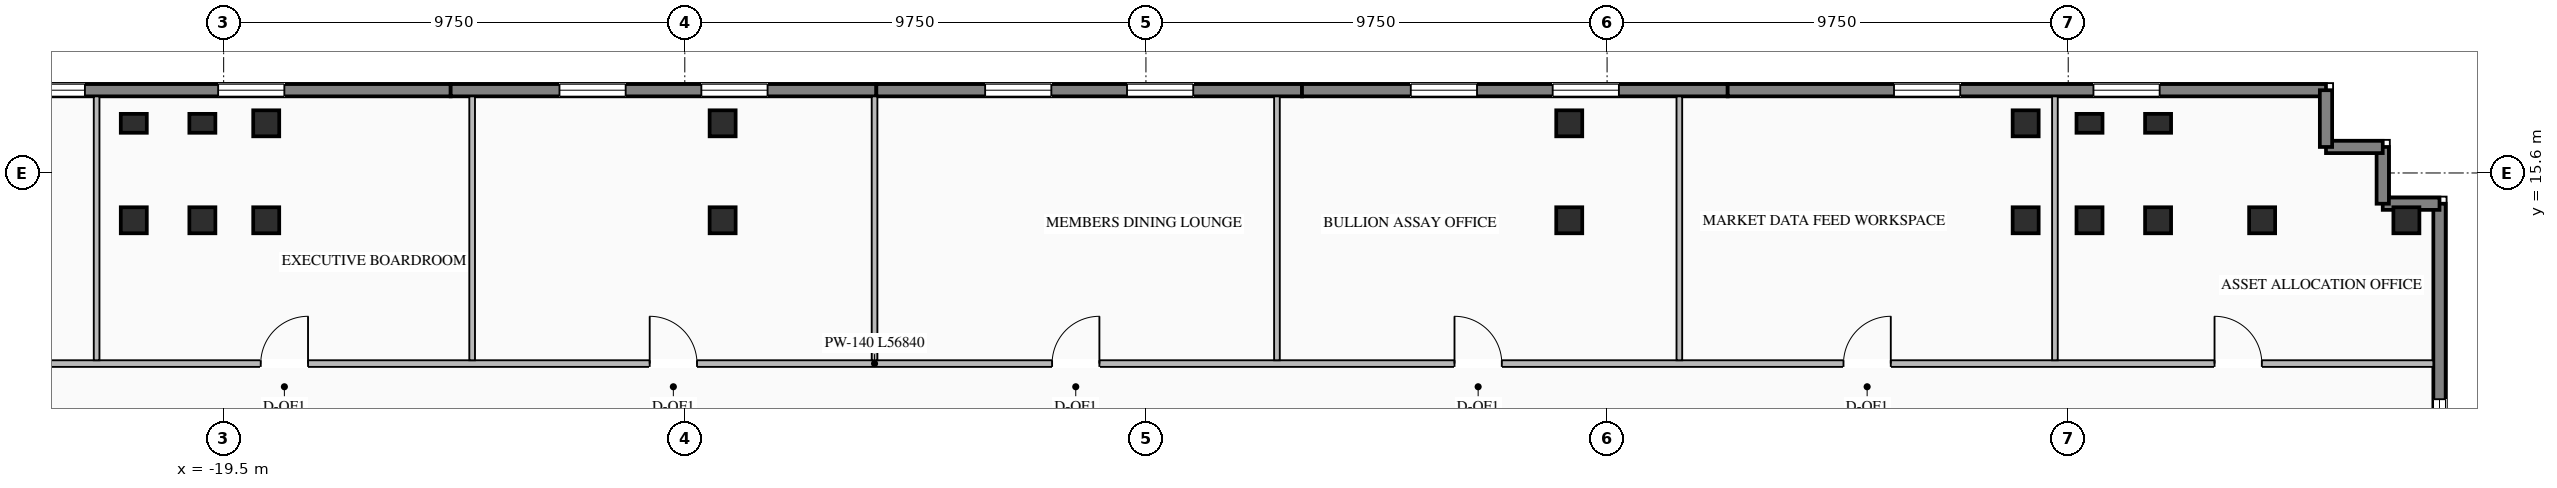
"""IFC4 building model, lengths in metres.
Left out: names, types, materials, properties, quantities, classifications, styles, units other than length and angle.
Written with IfcOpenShell. Run it as: python <this file> out.ifc"""

import sys

from ifc_helpers import new_model, si_unit, direction, frame, frame_2d, origin, origin_2d, place, context, subcontext, project, spatial, rectangle, i_section, extrude, element, fill, save


model = new_model("IFC4")
c1 = context("Model", 3, precision=1e-05, world=origin(), true_north=direction((0.0, 1.0)))
c2 = subcontext(c1, "Body", "Model", "MODEL_VIEW")
j1 = project(units=[si_unit("LENGTHUNIT", "METRE"), si_unit("PLANEANGLEUNIT", "RADIAN")], contexts=[c1])
p1 = place(None, origin())
s1 = spatial("IfcSite", under=j1, at=p1, CompositionType="ELEMENT")
p2 = place(p1, origin())
s2 = spatial("IfcBuilding", under=s1, at=p2, CompositionType="ELEMENT")
p3 = place(p2, frame((0.0, 0.0, 236.1)))
s3 = spatial("IfcBuildingStorey", under=s2, at=p3, CompositionType="ELEMENT", Elevation=236.1)
for number, where, z_axis, x_axis in (
    (1, (-21.4, 14.6, 0.0), (0.0, 0.0, 1.0), (1.0, 0.0, 0.0)),
    (2, (-19.95, 14.6, 0.0), (0.0, 0.0, 1.0), (1.0, 0.0, 0.0)),
    (3, (-18.6, 14.6, 0.0), (0.0, 0.0, 1.0), (1.0, 0.0, 0.0)),
    (4, (-8.95, 14.6, 0.0), (0.0, 0.0, 1.0), (1.0, 0.0, 0.0)),
    (5, (8.95, 14.6, 0.0), (0.0, 0.0, 1.0), (1.0, 0.0, 0.0)),
    (6, (18.6, 14.6, 0.0), (0.0, 0.0, 1.0), (1.0, 0.0, 0.0)),
    (7, (19.95, 14.6, 0.0), (0.0, 0.0, 1.0), (1.0, 0.0, 0.0)),
    (8, (21.4, 14.6, 0.0), (0.0, 0.0, 1.0), (1.0, 0.0, 0.0)),
    (9, (23.6, 14.6, 0.0), (0.0, 0.0, 1.0), (1.0, 0.0, 0.0)),
    (10, (-18.6, 16.65, 0.0), (0.0, 0.0, 1.0), (1.0, 0.0, 0.0)),
    (11, (-8.95, 16.65, 0.0), (0.0, 0.0, 1.0), (1.0, 0.0, 0.0)),
    (12, (8.95, 16.65, 0.0), (0.0, 0.0, 1.0), (1.0, 0.0, 0.0)),
    (13, (18.6, 16.65, 0.0), (0.0, 0.0, 1.0), (1.0, 0.0, 0.0)),
    (14, (26.65, 14.6, 0.0), (0.0, 0.0, 1.0), (1.0, 0.0, 0.0)),
):
    element("IfcColumn", number, at=place(p3, frame(where, z_axis=z_axis, x_axis=x_axis)), inside=s3, PredefinedType="COLUMN", context=c2, shape_type="SweptSolid", body=[
        extrude(i_section(OverallWidth=0.55, OverallDepth=0.55, WebThickness=0.024, FlangeThickness=0.036, at=origin_2d()), origin(), (0.0, 0.0, 1.0), 3.45),
    ])
for number, where, z_axis, x_axis in (
    (15, (-21.4, 16.65, 0.0), (0.0, 0.0, 1.0), (1.0, 0.0, 0.0)),
    (16, (-19.95, 16.65, 0.0), (0.0, 0.0, 1.0), (1.0, 0.0, 0.0)),
    (17, (19.95, 16.65, 0.0), (0.0, 0.0, 1.0), (1.0, 0.0, 0.0)),
    (18, (21.4, 16.65, 0.0), (0.0, 0.0, 1.0), (1.0, 0.0, 0.0)),
):
    element("IfcColumn", number, at=place(p3, frame(where, z_axis=z_axis, x_axis=x_axis)), inside=s3, PredefinedType="PILASTER", context=c2, shape_type="SweptSolid", body=[
        extrude(rectangle(XDim=0.55, YDim=0.4, at=origin_2d()), origin(), (0.0, 0.0, 1.0), 3.45),
    ])
p4 = place(p3, frame((-27.35, 17.35, 0.0), z_axis=(0.0, 0.0, 1.0), x_axis=(1.0, 0.0, 0.0)))
e19 = element("IfcWall", 19, at=p4, inside=s3, PredefinedType="STANDARD", context=c2, shape_type="SweptSolid", body=[
    extrude(rectangle(XDim=12.65, YDim=0.26, at=frame_2d((6.325, 0.0))), origin(), (0.0, 0.0, 1.0), 3.25),
])
p5 = place(p4, frame((3.517, 0.0, 0.76)))
e20 = element("IfcOpeningElement", 20, at=p5, cuts=e19, PredefinedType="OPENING", context=c2, shape_type="SweptSolid", body=[
    extrude(rectangle(XDim=1.4, YDim=1.95, at=frame_2d((0.7, 0.975))), frame((0.0, 0.14, 0.0), z_axis=(0.0, -1.0, 0.0), x_axis=(1.0, 0.0, 0.0)), (0.0, 0.0, 1.0), 0.28),
])
p6 = place(p4, frame((7.733, 0.0, 0.76)))
e21 = element("IfcOpeningElement", 21, at=p6, cuts=e19, PredefinedType="OPENING", context=c2, shape_type="SweptSolid", body=[
    extrude(rectangle(XDim=1.4, YDim=1.95, at=frame_2d((0.7, 0.975))), frame((0.0, 0.14, 0.0), z_axis=(0.0, -1.0, 0.0), x_axis=(1.0, 0.0, 0.0)), (0.0, 0.0, 1.0), 0.28),
])
p7 = place(p3, frame((-14.7, 17.35, 0.0), z_axis=(0.0, 0.0, 1.0), x_axis=(1.0, 0.0, 0.0)))
e22 = element("IfcWall", 22, at=p7, inside=s3, PredefinedType="STANDARD", context=c2, shape_type="SweptSolid", body=[
    extrude(rectangle(XDim=9.0, YDim=0.26, at=frame_2d((4.5, 0.0))), origin(), (0.0, 0.0, 1.0), 3.25),
])
p8 = place(p7, frame((2.3, 0.0, 0.76)))
e23 = element("IfcOpeningElement", 23, at=p8, cuts=e22, PredefinedType="OPENING", context=c2, shape_type="SweptSolid", body=[
    extrude(rectangle(XDim=1.4, YDim=1.95, at=frame_2d((0.7, 0.975))), frame((0.0, 0.14, 0.0), z_axis=(0.0, -1.0, 0.0), x_axis=(1.0, 0.0, 0.0)), (0.0, 0.0, 1.0), 0.28),
])
p9 = place(p7, frame((5.3, 0.0, 0.76)))
e24 = element("IfcOpeningElement", 24, at=p9, cuts=e22, PredefinedType="OPENING", context=c2, shape_type="SweptSolid", body=[
    extrude(rectangle(XDim=1.4, YDim=1.95, at=frame_2d((0.7, 0.975))), frame((0.0, 0.14, 0.0), z_axis=(0.0, -1.0, 0.0), x_axis=(1.0, 0.0, 0.0)), (0.0, 0.0, 1.0), 0.28),
])
p10 = place(p3, frame((-5.7, 17.35, 0.0), z_axis=(0.0, 0.0, 1.0), x_axis=(1.0, 0.0, 0.0)))
e25 = element("IfcWall", 25, at=p10, inside=s3, PredefinedType="STANDARD", context=c2, shape_type="SweptSolid", body=[
    extrude(rectangle(XDim=9.0, YDim=0.26, at=frame_2d((4.5, 0.0))), origin(), (0.0, 0.0, 1.0), 3.25),
])
p11 = place(p10, frame((2.3, 0.0, 0.76)))
e26 = element("IfcOpeningElement", 26, at=p11, cuts=e25, PredefinedType="OPENING", context=c2, shape_type="SweptSolid", body=[
    extrude(rectangle(XDim=1.4, YDim=1.95, at=frame_2d((0.7, 0.975))), frame((0.0, 0.14, 0.0), z_axis=(0.0, -1.0, 0.0), x_axis=(1.0, 0.0, 0.0)), (0.0, 0.0, 1.0), 0.28),
])
p12 = place(p10, frame((5.3, 0.0, 0.76)))
e27 = element("IfcOpeningElement", 27, at=p12, cuts=e25, PredefinedType="OPENING", context=c2, shape_type="SweptSolid", body=[
    extrude(rectangle(XDim=1.4, YDim=1.95, at=frame_2d((0.7, 0.975))), frame((0.0, 0.14, 0.0), z_axis=(0.0, -1.0, 0.0), x_axis=(1.0, 0.0, 0.0)), (0.0, 0.0, 1.0), 0.28),
])
p13 = place(p3, frame((3.3, 17.35, 0.0), z_axis=(0.0, 0.0, 1.0), x_axis=(1.0, 0.0, 0.0)))
e28 = element("IfcWall", 28, at=p13, inside=s3, PredefinedType="STANDARD", context=c2, shape_type="SweptSolid", body=[
    extrude(rectangle(XDim=9.0, YDim=0.26, at=frame_2d((4.5, 0.0))), origin(), (0.0, 0.0, 1.0), 3.25),
])
p14 = place(p13, frame((2.3, 0.0, 0.76)))
e29 = element("IfcOpeningElement", 29, at=p14, cuts=e28, PredefinedType="OPENING", context=c2, shape_type="SweptSolid", body=[
    extrude(rectangle(XDim=1.4, YDim=1.95, at=frame_2d((0.7, 0.975))), frame((0.0, 0.14, 0.0), z_axis=(0.0, -1.0, 0.0), x_axis=(1.0, 0.0, 0.0)), (0.0, 0.0, 1.0), 0.28),
])
p15 = place(p13, frame((5.3, 0.0, 0.76)))
e30 = element("IfcOpeningElement", 30, at=p15, cuts=e28, PredefinedType="OPENING", context=c2, shape_type="SweptSolid", body=[
    extrude(rectangle(XDim=1.4, YDim=1.95, at=frame_2d((0.7, 0.975))), frame((0.0, 0.14, 0.0), z_axis=(0.0, -1.0, 0.0), x_axis=(1.0, 0.0, 0.0)), (0.0, 0.0, 1.0), 0.28),
])
p16 = place(p3, frame((12.3, 17.35, 0.0), z_axis=(0.0, 0.0, 1.0), x_axis=(1.0, 0.0, 0.0)))
e31 = element("IfcWall", 31, at=p16, inside=s3, PredefinedType="STANDARD", context=c2, shape_type="SweptSolid", body=[
    extrude(rectangle(XDim=12.65, YDim=0.26, at=frame_2d((6.325, 0.0))), origin(), (0.0, 0.0, 1.0), 3.25),
])
p17 = place(p16, frame((3.517, 0.0, 0.76)))
e32 = element("IfcOpeningElement", 32, at=p17, cuts=e31, PredefinedType="OPENING", context=c2, shape_type="SweptSolid", body=[
    extrude(rectangle(XDim=1.4, YDim=1.95, at=frame_2d((0.7, 0.975))), frame((0.0, 0.14, 0.0), z_axis=(0.0, -1.0, 0.0), x_axis=(1.0, 0.0, 0.0)), (0.0, 0.0, 1.0), 0.28),
])
p18 = place(p16, frame((7.733, 0.0, 0.76)))
e33 = element("IfcOpeningElement", 33, at=p18, cuts=e31, PredefinedType="OPENING", context=c2, shape_type="SweptSolid", body=[
    extrude(rectangle(XDim=1.4, YDim=1.95, at=frame_2d((0.7, 0.975))), frame((0.0, 0.14, 0.0), z_axis=(0.0, -1.0, 0.0), x_axis=(1.0, 0.0, 0.0)), (0.0, 0.0, 1.0), 0.28),
])
p19 = place(p3, frame((27.35, 14.95, 0.0), z_axis=(0.0, 0.0, 1.0), x_axis=(0.0, -1.0, 0.0)))
e34 = element("IfcWall", 34, at=p19, inside=s3, PredefinedType="STANDARD", context=c2, shape_type="SweptSolid", body=[
    extrude(rectangle(XDim=15.85, YDim=0.26, at=frame_2d((7.925, 0.0))), origin(), (0.0, 0.0, 1.0), 3.25),
])
p20 = place(p19, frame((4.133, 0.0, 0.76)))
e35 = element("IfcOpeningElement", 35, at=p20, cuts=e34, PredefinedType="OPENING", context=c2, shape_type="SweptSolid", body=[
    extrude(rectangle(XDim=1.2, YDim=1.95, at=frame_2d((0.6, 0.975))), frame((0.0, 0.14, 0.0), z_axis=(0.0, -1.0, 0.0), x_axis=(1.0, 0.0, 0.0)), (0.0, 0.0, 1.0), 0.28),
])
p21 = place(p19, frame((9.967, 0.0, 0.76)))
e36 = element("IfcOpeningElement", 36, at=p21, cuts=e34, PredefinedType="OPENING", context=c2, shape_type="SweptSolid", body=[
    extrude(rectangle(XDim=1.2, YDim=1.95, at=frame_2d((0.6, 0.975))), frame((0.0, 0.14, 0.0), z_axis=(0.0, -1.0, 0.0), x_axis=(1.0, 0.0, 0.0)), (0.0, 0.0, 1.0), 0.28),
])
p22 = place(p3, frame((27.35, 14.95, 0.0), z_axis=(0.0, 0.0, 1.0), x_axis=(-1.0, 0.0, 0.0)))
e37 = element("IfcWall", 37, at=p22, inside=s3, PredefinedType="STANDARD", context=c2, shape_type="SweptSolid", body=[
    extrude(rectangle(XDim=1.2, YDim=0.26, at=frame_2d((0.6, 0.0))), origin(), (0.0, 0.0, 1.0), 2.565),
])
for number, where, z_axis, x_axis in (
    (38, (26.15, 14.95, 0.0), (0.0, 0.0, 1.0), (0.0, 1.0, 0.0)),
    (39, (26.15, 16.15, 0.0), (0.0, 0.0, 1.0), (-1.0, 0.0, 0.0)),
):
    element("IfcWall", number, at=place(p3, frame(where, z_axis=z_axis, x_axis=x_axis)), inside=s3, PredefinedType="STANDARD", context=c2, shape_type="SweptSolid", body=[
        extrude(rectangle(XDim=1.2, YDim=0.26, at=frame_2d((0.6, 0.0))), origin(), (0.0, 0.0, 1.0), 2.565),
    ])
p23 = place(p3, frame((24.95, 16.15, 0.0), z_axis=(0.0, 0.0, 1.0), x_axis=(0.0, 1.0, 0.0)))
e40 = element("IfcWall", 40, at=p23, inside=s3, PredefinedType="STANDARD", context=c2, shape_type="SweptSolid", body=[
    extrude(rectangle(XDim=1.2, YDim=0.26, at=frame_2d((0.6, 0.0))), origin(), (0.0, 0.0, 1.0), 2.565),
])
p24 = place(p3, frame((-29.62, 11.57, 0.0), z_axis=(0.0, 0.0, 1.0), x_axis=(1.0, 0.0, 0.0)))
e41 = element("IfcWall", 41, at=p24, inside=s3, PredefinedType="STANDARD", context=c2, shape_type="SweptSolid", body=[
    extrude(rectangle(XDim=56.84, YDim=0.14, at=frame_2d((28.42, 0.0))), origin(), (0.0, 0.0, 1.0), 2.845),
])
p25 = place(p24, frame((3.343, 0.0, 0.0)))
e42 = element("IfcOpeningElement", 42, at=p25, cuts=e41, PredefinedType="OPENING", context=c2, shape_type="SweptSolid", body=[
    extrude(rectangle(XDim=1.0, YDim=2.08, at=frame_2d((0.5, 1.04))), frame((0.0, 0.08, 0.0), z_axis=(0.0, -1.0, 0.0), x_axis=(1.0, 0.0, 0.0)), (0.0, 0.0, 1.0), 0.16),
])
p26 = place(p24, frame((10.904, 0.0, 0.0)))
e43 = element("IfcOpeningElement", 43, at=p26, cuts=e41, PredefinedType="OPENING", context=c2, shape_type="SweptSolid", body=[
    extrude(rectangle(XDim=1.0, YDim=2.08, at=frame_2d((0.5, 1.04))), frame((0.0, 0.08, 0.0), z_axis=(0.0, -1.0, 0.0), x_axis=(1.0, 0.0, 0.0)), (0.0, 0.0, 1.0), 0.16),
])
p27 = place(p24, frame((19.128, 0.0, 0.0)))
e44 = element("IfcOpeningElement", 44, at=p27, cuts=e41, PredefinedType="OPENING", context=c2, shape_type="SweptSolid", body=[
    extrude(rectangle(XDim=1.0, YDim=2.08, at=frame_2d((0.5, 1.04))), frame((0.0, 0.08, 0.0), z_axis=(0.0, -1.0, 0.0), x_axis=(1.0, 0.0, 0.0)), (0.0, 0.0, 1.0), 0.16),
])
p28 = place(p24, frame((27.636, 0.0, 0.0)))
e45 = element("IfcOpeningElement", 45, at=p28, cuts=e41, PredefinedType="OPENING", context=c2, shape_type="SweptSolid", body=[
    extrude(rectangle(XDim=1.0, YDim=2.08, at=frame_2d((0.5, 1.04))), frame((0.0, 0.08, 0.0), z_axis=(0.0, -1.0, 0.0), x_axis=(1.0, 0.0, 0.0)), (0.0, 0.0, 1.0), 0.16),
])
p29 = place(p24, frame((36.144, 0.0, 0.0)))
e46 = element("IfcOpeningElement", 46, at=p29, cuts=e41, PredefinedType="OPENING", context=c2, shape_type="SweptSolid", body=[
    extrude(rectangle(XDim=1.0, YDim=2.08, at=frame_2d((0.5, 1.04))), frame((0.0, 0.08, 0.0), z_axis=(0.0, -1.0, 0.0), x_axis=(1.0, 0.0, 0.0)), (0.0, 0.0, 1.0), 0.16),
])
p30 = place(p24, frame((44.368, 0.0, 0.0)))
e47 = element("IfcOpeningElement", 47, at=p30, cuts=e41, PredefinedType="OPENING", context=c2, shape_type="SweptSolid", body=[
    extrude(rectangle(XDim=1.0, YDim=2.08, at=frame_2d((0.5, 1.04))), frame((0.0, 0.08, 0.0), z_axis=(0.0, -1.0, 0.0), x_axis=(1.0, 0.0, 0.0)), (0.0, 0.0, 1.0), 0.16),
])
p31 = place(p24, frame((52.213, 0.0, 0.0)))
e48 = element("IfcOpeningElement", 48, at=p31, cuts=e41, PredefinedType="OPENING", context=c2, shape_type="SweptSolid", body=[
    extrude(rectangle(XDim=1.0, YDim=2.08, at=frame_2d((0.5, 1.04))), frame((0.0, 0.08, 0.0), z_axis=(0.0, -1.0, 0.0), x_axis=(1.0, 0.0, 0.0)), (0.0, 0.0, 1.0), 0.16),
])
for number, where, z_axis, x_axis in (
    (49, (-22.186, 11.64, 0.0), (0.0, 0.0, 1.0), (0.0, 1.0, 0.0)),
    (50, (-14.246, 11.64, 0.0), (0.0, 0.0, 1.0), (0.0, 1.0, 0.0)),
    (51, (-5.738, 11.64, 0.0), (0.0, 0.0, 1.0), (0.0, 1.0, 0.0)),
    (52, (2.77, 11.64, 0.0), (0.0, 0.0, 1.0), (0.0, 1.0, 0.0)),
    (53, (11.278, 11.64, 0.0), (0.0, 0.0, 1.0), (0.0, 1.0, 0.0)),
    (54, (19.219, 11.64, 0.0), (0.0, 0.0, 1.0), (0.0, 1.0, 0.0)),
):
    element("IfcWall", number, at=place(p3, frame(where, z_axis=z_axis, x_axis=x_axis)), inside=s3, PredefinedType="STANDARD", context=c2, shape_type="SweptSolid", body=[
        extrude(rectangle(XDim=5.58, YDim=0.12, at=frame_2d((2.79, 0.0))), origin(), (0.0, 0.0, 1.0), 3.25),
    ])
p32 = place(p5, origin())
e55 = element("IfcWindow", 55, at=p32, inside=s3, PartitioningType="SINGLE_PANEL", PredefinedType="WINDOW", context=c2, shape_type="SweptSolid", body=[
    extrude(rectangle(XDim=1.4, YDim=1.95, at=frame_2d((0.7, 0.975))), frame((0.0, 0.03, 0.0), z_axis=(0.0, -1.0, 0.0), x_axis=(1.0, 0.0, 0.0)), (0.0, 0.0, 1.0), 0.06),
])
fill(e20, e55)
p33 = place(p6, origin())
e56 = element("IfcWindow", 56, at=p33, inside=s3, PartitioningType="SINGLE_PANEL", PredefinedType="WINDOW", context=c2, shape_type="SweptSolid", body=[
    extrude(rectangle(XDim=1.4, YDim=1.95, at=frame_2d((0.7, 0.975))), frame((0.0, 0.03, 0.0), z_axis=(0.0, -1.0, 0.0), x_axis=(1.0, 0.0, 0.0)), (0.0, 0.0, 1.0), 0.06),
])
fill(e21, e56)
p34 = place(p8, origin())
e57 = element("IfcWindow", 57, at=p34, inside=s3, PartitioningType="SINGLE_PANEL", PredefinedType="WINDOW", context=c2, shape_type="SweptSolid", body=[
    extrude(rectangle(XDim=1.4, YDim=1.95, at=frame_2d((0.7, 0.975))), frame((0.0, 0.03, 0.0), z_axis=(0.0, -1.0, 0.0), x_axis=(1.0, 0.0, 0.0)), (0.0, 0.0, 1.0), 0.06),
])
fill(e23, e57)
p35 = place(p9, origin())
e58 = element("IfcWindow", 58, at=p35, inside=s3, PartitioningType="SINGLE_PANEL", PredefinedType="WINDOW", context=c2, shape_type="SweptSolid", body=[
    extrude(rectangle(XDim=1.4, YDim=1.95, at=frame_2d((0.7, 0.975))), frame((0.0, 0.03, 0.0), z_axis=(0.0, -1.0, 0.0), x_axis=(1.0, 0.0, 0.0)), (0.0, 0.0, 1.0), 0.06),
])
fill(e24, e58)
p36 = place(p11, origin())
e59 = element("IfcWindow", 59, at=p36, inside=s3, PartitioningType="SINGLE_PANEL", PredefinedType="WINDOW", context=c2, shape_type="SweptSolid", body=[
    extrude(rectangle(XDim=1.4, YDim=1.95, at=frame_2d((0.7, 0.975))), frame((0.0, 0.03, 0.0), z_axis=(0.0, -1.0, 0.0), x_axis=(1.0, 0.0, 0.0)), (0.0, 0.0, 1.0), 0.06),
])
fill(e26, e59)
p37 = place(p12, origin())
e60 = element("IfcWindow", 60, at=p37, inside=s3, PartitioningType="SINGLE_PANEL", PredefinedType="WINDOW", context=c2, shape_type="SweptSolid", body=[
    extrude(rectangle(XDim=1.4, YDim=1.95, at=frame_2d((0.7, 0.975))), frame((0.0, 0.03, 0.0), z_axis=(0.0, -1.0, 0.0), x_axis=(1.0, 0.0, 0.0)), (0.0, 0.0, 1.0), 0.06),
])
fill(e27, e60)
p38 = place(p14, origin())
e61 = element("IfcWindow", 61, at=p38, inside=s3, PartitioningType="SINGLE_PANEL", PredefinedType="WINDOW", context=c2, shape_type="SweptSolid", body=[
    extrude(rectangle(XDim=1.4, YDim=1.95, at=frame_2d((0.7, 0.975))), frame((0.0, 0.03, 0.0), z_axis=(0.0, -1.0, 0.0), x_axis=(1.0, 0.0, 0.0)), (0.0, 0.0, 1.0), 0.06),
])
fill(e29, e61)
p39 = place(p15, origin())
e62 = element("IfcWindow", 62, at=p39, inside=s3, PartitioningType="SINGLE_PANEL", PredefinedType="WINDOW", context=c2, shape_type="SweptSolid", body=[
    extrude(rectangle(XDim=1.4, YDim=1.95, at=frame_2d((0.7, 0.975))), frame((0.0, 0.03, 0.0), z_axis=(0.0, -1.0, 0.0), x_axis=(1.0, 0.0, 0.0)), (0.0, 0.0, 1.0), 0.06),
])
fill(e30, e62)
p40 = place(p17, origin())
e63 = element("IfcWindow", 63, at=p40, inside=s3, PartitioningType="SINGLE_PANEL", PredefinedType="WINDOW", context=c2, shape_type="SweptSolid", body=[
    extrude(rectangle(XDim=1.4, YDim=1.95, at=frame_2d((0.7, 0.975))), frame((0.0, 0.03, 0.0), z_axis=(0.0, -1.0, 0.0), x_axis=(1.0, 0.0, 0.0)), (0.0, 0.0, 1.0), 0.06),
])
fill(e32, e63)
p41 = place(p18, origin())
e64 = element("IfcWindow", 64, at=p41, inside=s3, PartitioningType="SINGLE_PANEL", PredefinedType="WINDOW", context=c2, shape_type="SweptSolid", body=[
    extrude(rectangle(XDim=1.4, YDim=1.95, at=frame_2d((0.7, 0.975))), frame((0.0, 0.03, 0.0), z_axis=(0.0, -1.0, 0.0), x_axis=(1.0, 0.0, 0.0)), (0.0, 0.0, 1.0), 0.06),
])
fill(e33, e64)
p42 = place(p20, origin())
e65 = element("IfcWindow", 65, at=p42, inside=s3, PartitioningType="SINGLE_PANEL", PredefinedType="WINDOW", context=c2, shape_type="SweptSolid", body=[
    extrude(rectangle(XDim=1.2, YDim=1.95, at=frame_2d((0.6, 0.975))), frame((0.0, 0.03, 0.0), z_axis=(0.0, -1.0, 0.0), x_axis=(1.0, 0.0, 0.0)), (0.0, 0.0, 1.0), 0.06),
])
fill(e35, e65)
p43 = place(p26, origin())
e66 = element("IfcDoor", 66, at=p43, inside=s3, OperationType="SINGLE_SWING_RIGHT", PredefinedType="DOOR", context=c2, shape_type="SweptSolid", body=[
    extrude(rectangle(XDim=1.0, YDim=2.08, at=frame_2d((0.5, 1.04))), frame((0.0, 0.025, 0.0), z_axis=(0.0, -1.0, 0.0), x_axis=(1.0, 0.0, 0.0)), (0.0, 0.0, 1.0), 0.05),
])
fill(e43, e66)
p44 = place(p27, origin())
e67 = element("IfcDoor", 67, at=p44, inside=s3, OperationType="SINGLE_SWING_LEFT", PredefinedType="DOOR", context=c2, shape_type="SweptSolid", body=[
    extrude(rectangle(XDim=1.0, YDim=2.08, at=frame_2d((0.5, 1.04))), frame((0.0, 0.025, 0.0), z_axis=(0.0, -1.0, 0.0), x_axis=(1.0, 0.0, 0.0)), (0.0, 0.0, 1.0), 0.05),
])
fill(e44, e67)
p45 = place(p28, origin())
e68 = element("IfcDoor", 68, at=p45, inside=s3, OperationType="SINGLE_SWING_RIGHT", PredefinedType="DOOR", context=c2, shape_type="SweptSolid", body=[
    extrude(rectangle(XDim=1.0, YDim=2.08, at=frame_2d((0.5, 1.04))), frame((0.0, 0.025, 0.0), z_axis=(0.0, -1.0, 0.0), x_axis=(1.0, 0.0, 0.0)), (0.0, 0.0, 1.0), 0.05),
])
fill(e45, e68)
p46 = place(p29, origin())
e69 = element("IfcDoor", 69, at=p46, inside=s3, OperationType="SINGLE_SWING_LEFT", PredefinedType="DOOR", context=c2, shape_type="SweptSolid", body=[
    extrude(rectangle(XDim=1.0, YDim=2.08, at=frame_2d((0.5, 1.04))), frame((0.0, 0.025, 0.0), z_axis=(0.0, -1.0, 0.0), x_axis=(1.0, 0.0, 0.0)), (0.0, 0.0, 1.0), 0.05),
])
fill(e46, e69)
p47 = place(p30, origin())
e70 = element("IfcDoor", 70, at=p47, inside=s3, OperationType="SINGLE_SWING_RIGHT", PredefinedType="DOOR", context=c2, shape_type="SweptSolid", body=[
    extrude(rectangle(XDim=1.0, YDim=2.08, at=frame_2d((0.5, 1.04))), frame((0.0, 0.025, 0.0), z_axis=(0.0, -1.0, 0.0), x_axis=(1.0, 0.0, 0.0)), (0.0, 0.0, 1.0), 0.05),
])
fill(e47, e70)
p48 = place(p31, origin())
e71 = element("IfcDoor", 71, at=p48, inside=s3, OperationType="SINGLE_SWING_LEFT", PredefinedType="DOOR", context=c2, shape_type="SweptSolid", body=[
    extrude(rectangle(XDim=1.0, YDim=2.08, at=frame_2d((0.5, 1.04))), frame((0.0, 0.025, 0.0), z_axis=(0.0, -1.0, 0.0), x_axis=(1.0, 0.0, 0.0)), (0.0, 0.0, 1.0), 0.05),
])
fill(e48, e71)
save(model, sys.argv[1])
